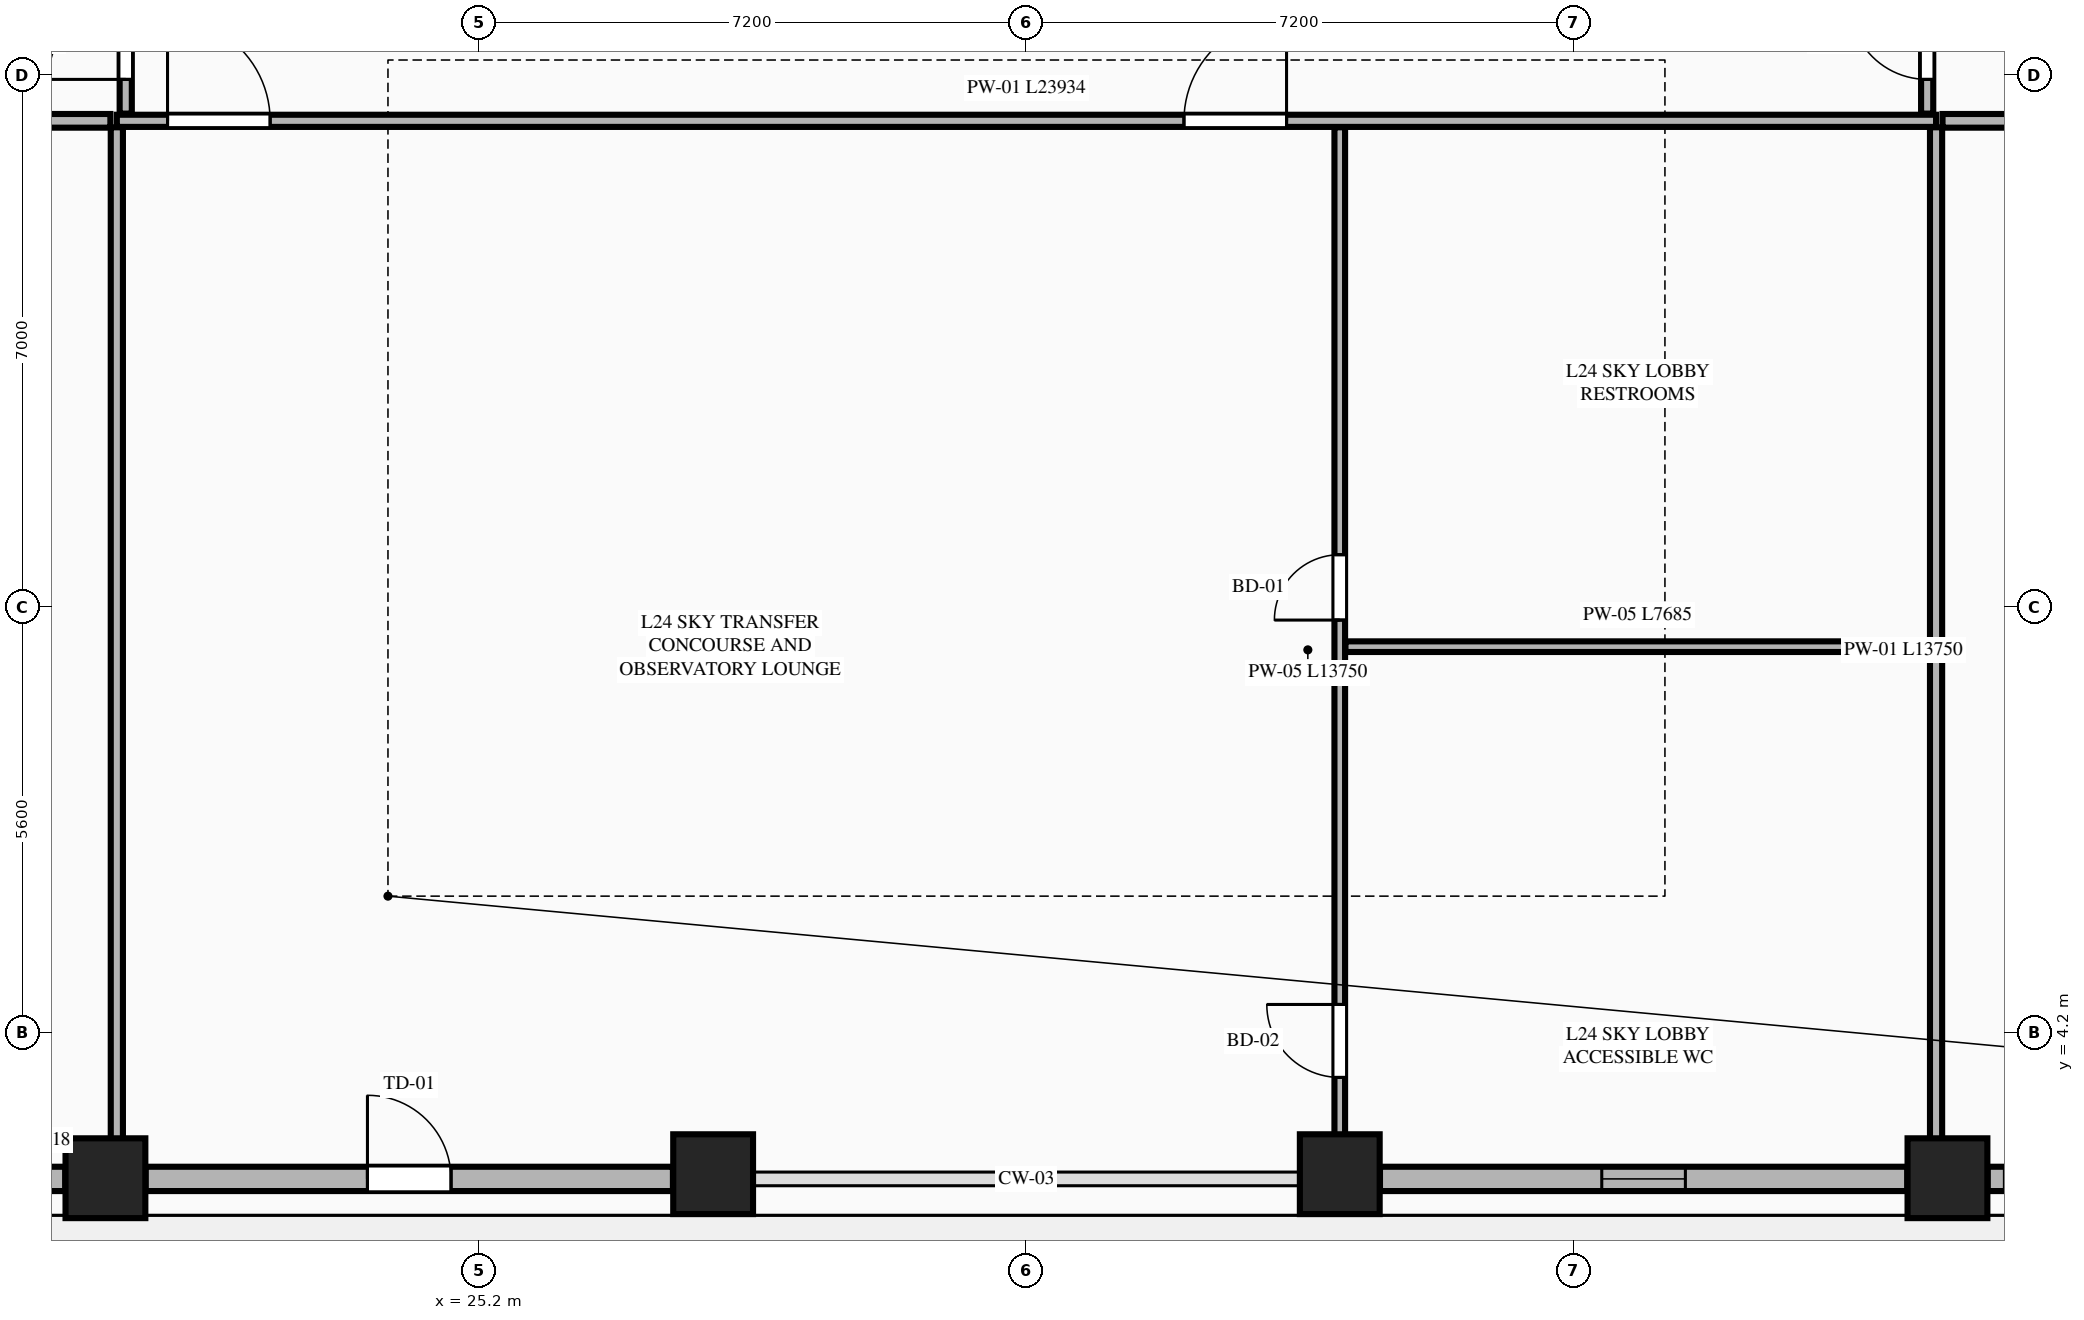
"""IFC4 building model, lengths in metres.
Left out: names, types, materials, properties, quantities, classifications, styles, units other than length and angle.
Written with IfcOpenShell. Run it as: python <this file> out.ifc"""

import sys

from ifc_helpers import new_model, si_unit, direction, frame, frame_2d, origin, origin_2d, place, context, subcontext, project, spatial, rectangle, extrude, element, fill, save


model = new_model("IFC4")
c1 = context("Model", 3, precision=1e-05, world=origin(), true_north=direction((0.0, 1.0)))
c2 = subcontext(c1, "Body", "Model", "MODEL_VIEW")
j1 = project(units=[si_unit("LENGTHUNIT", "METRE"), si_unit("PLANEANGLEUNIT", "RADIAN")], contexts=[c1])
p1 = place(None, origin())
s1 = spatial("IfcSite", under=j1, at=p1, CompositionType="ELEMENT")
p2 = place(p1, origin())
s2 = spatial("IfcBuilding", under=s1, at=p2, CompositionType="ELEMENT")
p3 = place(p2, frame((0.0, 0.0, 94.2)))
s3 = spatial("IfcBuildingStorey", under=s2, at=p3, CompositionType="ELEMENT", Elevation=94.2)
for number, where, z_axis, x_axis in (
    (1, (20.283, 2.289, 0.0), (0.0, 0.0, 1.0), (1.0, 0.0, 0.0)),
    (2, (28.278, 2.342, 0.0), (0.0, 0.0, 1.0), (1.0, 0.0, 0.0)),
    (3, (36.522, 2.342, 0.0), (0.0, 0.0, 1.0), (1.0, 0.0, 0.0)),
    (4, (44.517, 2.289, 0.0), (0.0, 0.0, 1.0), (1.0, 0.0, 0.0)),
):
    element("IfcColumn", number, at=place(p3, frame(where, z_axis=z_axis, x_axis=x_axis)), inside=s3, PredefinedType="COLUMN", context=c2, shape_type="SweptSolid", body=[
        extrude(rectangle(XDim=1.05, YDim=1.05, at=origin_2d()), origin(), (0.0, 0.0, 1.0), 4.2),
    ])
p4 = place(p3, frame((18.436, 2.28, 0.0), z_axis=(0.0, 0.0, 1.0), x_axis=(1.0, 0.0, 0.0)))
e5 = element("IfcWall", 5, at=p4, inside=s3, PredefinedType="STANDARD", context=c2, shape_type="SweptSolid", body=[
    extrude(rectangle(XDim=1.318, YDim=0.32, at=frame_2d((0.659, 0.0))), origin(), (0.0, 0.0, 1.0), 3.99),
])
p5 = place(p4, frame((0.22, 0.0, 0.75)))
e6 = element("IfcOpeningElement", 6, at=p5, cuts=e5, PredefinedType="OPENING", context=c2, shape_type="SweptSolid", body=[
    extrude(rectangle(XDim=0.878, YDim=1.7, at=frame_2d((0.439, 0.85))), frame((0.0, 0.17, 0.0), z_axis=(0.0, -1.0, 0.0), x_axis=(1.0, 0.0, 0.0)), (0.0, 0.0, 1.0), 0.34),
])
p6 = place(p3, frame((20.812, 2.28, 0.0), z_axis=(0.0, 0.0, 1.0), x_axis=(1.0, 0.0, 0.0)))
e7 = element("IfcWall", 7, at=p6, inside=s3, PredefinedType="STANDARD", context=c2, shape_type="SweptSolid", body=[
    extrude(rectangle(XDim=6.937, YDim=0.32, at=frame_2d((3.469, 0.0))), origin(), (0.0, 0.0, 1.0), 2.59),
])
p7 = place(p6, frame((2.918, 0.0, 0.0)))
e8 = element("IfcOpeningElement", 8, at=p7, cuts=e7, PredefinedType="OPENING", context=c2, shape_type="SweptSolid", body=[
    extrude(rectangle(XDim=1.1, YDim=2.25, at=frame_2d((0.55, 1.125))), frame((0.0, 0.17, 0.0), z_axis=(0.0, -1.0, 0.0), x_axis=(1.0, 0.0, 0.0)), (0.0, 0.0, 1.0), 0.34),
])
p8 = place(p3, frame((37.051, 2.28, 0.0), z_axis=(0.0, 0.0, 1.0), x_axis=(1.0, 0.0, 0.0)))
e9 = element("IfcWall", 9, at=p8, inside=s3, PredefinedType="STANDARD", context=c2, shape_type="SweptSolid", body=[
    extrude(rectangle(XDim=6.937, YDim=0.32, at=frame_2d((3.469, 0.0))), origin(), (0.0, 0.0, 1.0), 2.59),
])
p9 = place(p8, frame((2.918, 0.0, 0.75)))
e10 = element("IfcOpeningElement", 10, at=p9, cuts=e9, PredefinedType="OPENING", context=c2, shape_type="SweptSolid", body=[
    extrude(rectangle(XDim=1.1, YDim=1.69, at=frame_2d((0.55, 0.845))), frame((0.0, 0.17, 0.0), z_axis=(0.0, -1.0, 0.0), x_axis=(1.0, 0.0, 0.0)), (0.0, 0.0, 1.0), 0.34),
])
p10 = place(p3, frame((45.046, 2.28, 0.0), z_axis=(0.0, 0.0, 1.0), x_axis=(1.0, 0.0, 0.0)))
e11 = element("IfcWall", 11, at=p10, inside=s3, PredefinedType="STANDARD", context=c2, shape_type="SweptSolid", body=[
    extrude(rectangle(XDim=1.318, YDim=0.32, at=frame_2d((0.659, 0.0))), origin(), (0.0, 0.0, 1.0), 3.99),
])
p11 = place(p10, frame((0.22, 0.0, 0.75)))
e12 = element("IfcOpeningElement", 12, at=p11, cuts=e11, PredefinedType="OPENING", context=c2, shape_type="SweptSolid", body=[
    extrude(rectangle(XDim=0.878, YDim=1.7, at=frame_2d((0.439, 0.85))), frame((0.0, 0.17, 0.0), z_axis=(0.0, -1.0, 0.0), x_axis=(1.0, 0.0, 0.0)), (0.0, 0.0, 1.0), 0.34),
])
p12 = place(p3, frame((20.433, 16.2, 0.0), z_axis=(0.0, 0.0, 1.0), x_axis=(1.0, 0.0, 0.0)))
e13 = element("IfcWall", 13, at=p12, inside=s3, PredefinedType="PARTITIONING", context=c2, shape_type="SweptSolid", body=[
    extrude(rectangle(XDim=23.934, YDim=0.16, at=frame_2d((11.967, 0.0))), origin(), (0.0, 0.0, 1.0), 3.99),
])
p13 = place(p12, frame((0.667, 0.0, 0.0)))
e14 = element("IfcOpeningElement", 14, at=p13, cuts=e13, PredefinedType="OPENING", context=c2, shape_type="SweptSolid", body=[
    extrude(rectangle(XDim=1.35, YDim=2.35, at=frame_2d((0.675, 1.175))), frame((0.0, 0.09, 0.0), z_axis=(0.0, -1.0, 0.0), x_axis=(1.0, 0.0, 0.0)), (0.0, 0.0, 1.0), 0.18),
])
p14 = place(p12, frame((14.039, 0.0, 0.0)))
e15 = element("IfcOpeningElement", 15, at=p14, cuts=e13, PredefinedType="OPENING", context=c2, shape_type="SweptSolid", body=[
    extrude(rectangle(XDim=1.35, YDim=2.35, at=frame_2d((0.675, 1.175))), frame((0.0, 0.09, 0.0), z_axis=(0.0, -1.0, 0.0), x_axis=(1.0, 0.0, 0.0)), (0.0, 0.0, 1.0), 0.18),
])
p15 = place(p3, frame((36.522, 2.365, 0.0), z_axis=(0.0, 0.0, 1.0), x_axis=(0.0, 1.0, 0.0)))
e16 = element("IfcWall", 16, at=p15, inside=s3, PredefinedType="PLUMBINGWALL", context=c2, shape_type="SweptSolid", body=[
    extrude(rectangle(XDim=13.75, YDim=0.14, at=frame_2d((6.875, 0.0))), origin(), (0.0, 0.0, 1.0), 2.59),
])
p16 = place(p15, frame((7.267, 0.0, 0.0)))
e17 = element("IfcOpeningElement", 17, at=p16, cuts=e16, PredefinedType="OPENING", context=c2, shape_type="SweptSolid", body=[
    extrude(rectangle(XDim=0.86, YDim=2.1, at=frame_2d((0.43, 1.05))), frame((0.0, 0.08, 0.0), z_axis=(0.0, -1.0, 0.0), x_axis=(1.0, 0.0, 0.0)), (0.0, 0.0, 1.0), 0.16),
])
p17 = place(p15, frame((1.25, 0.0, 0.0)))
e18 = element("IfcOpeningElement", 18, at=p17, cuts=e16, PredefinedType="OPENING", context=c2, shape_type="SweptSolid", body=[
    extrude(rectangle(XDim=0.96, YDim=2.15, at=frame_2d((0.48, 1.075))), frame((0.0, 0.08, 0.0), z_axis=(0.0, -1.0, 0.0), x_axis=(1.0, 0.0, 0.0)), (0.0, 0.0, 1.0), 0.16),
])
p18 = place(p3, frame((36.597, 9.282, 0.0), z_axis=(0.0, 0.0, 1.0), x_axis=(1.0, 0.0, 0.0)))
e19 = element("IfcWall", 19, at=p18, inside=s3, PredefinedType="PLUMBINGWALL", context=c2, shape_type="SweptSolid", body=[
    extrude(rectangle(XDim=7.685, YDim=0.14, at=frame_2d((3.843, 0.0))), origin(), (0.0, 0.0, 1.0), 3.625),
])
for number, where, z_axis, x_axis in (
    (20, (44.367, 2.365, 0.0), (0.0, 0.0, 1.0), (0.0, 1.0, 0.0)),
    (21, (20.433, 2.365, 0.0), (0.0, 0.0, 1.0), (0.0, 1.0, 0.0)),
):
    element("IfcWall", number, at=place(p3, frame(where, z_axis=z_axis, x_axis=x_axis)), inside=s3, PredefinedType="PARTITIONING", context=c2, shape_type="SweptSolid", body=[
        extrude(rectangle(XDim=13.75, YDim=0.16, at=frame_2d((6.875, 0.0))), origin(), (0.0, 0.0, 1.0), 2.59),
    ])
p19 = place(p3, frame((10.426, 16.2, 0.0), z_axis=(0.0, 0.0, 1.0), x_axis=(1.0, 0.0, 0.0)))
e22 = element("IfcWall", 22, at=p19, inside=s3, PredefinedType="PARTITIONING", context=c2, shape_type="SweptSolid", body=[
    extrude(rectangle(XDim=9.922, YDim=0.18, at=frame_2d((4.961, 0.0))), origin(), (0.0, 0.0, 1.0), 3.99),
])
p20 = place(p3, frame((44.452, 16.2, 0.0), z_axis=(0.0, 0.0, 1.0), x_axis=(1.0, 0.0, 0.0)))
e23 = element("IfcWall", 23, at=p20, inside=s3, PredefinedType="PARTITIONING", context=c2, shape_type="SweptSolid", body=[
    extrude(rectangle(XDim=9.922, YDim=0.18, at=frame_2d((4.961, 0.0))), origin(), (0.0, 0.0, 1.0), 3.99),
])
p21 = place(p3, frame((20.55, 16.295, 0.0), z_axis=(0.0, 0.0, 1.0), x_axis=(0.0, 1.0, 0.0)))
e24 = element("IfcWall", 24, at=p21, inside=s3, PredefinedType="PARTITIONING", context=c2, shape_type="SweptSolid", body=[
    extrude(rectangle(XDim=19.36, YDim=0.16, at=frame_2d((9.68, 0.0))), origin(), (0.0, 0.0, 1.0), 2.59),
])
p22 = place(p21, frame((0.45, 0.0, 0.0)))
e25 = element("IfcOpeningElement", 25, at=p22, cuts=e24, PredefinedType="OPENING", context=c2, shape_type="SweptSolid", body=[
    extrude(rectangle(XDim=1.02, YDim=2.25, at=frame_2d((0.51, 1.125))), frame((0.0, 0.09, 0.0), z_axis=(0.0, -1.0, 0.0), x_axis=(1.0, 0.0, 0.0)), (0.0, 0.0, 1.0), 0.18),
])
p23 = place(p3, frame((44.25, 16.295, 0.0), z_axis=(0.0, 0.0, 1.0), x_axis=(0.0, 1.0, 0.0)))
e26 = element("IfcWall", 26, at=p23, inside=s3, PredefinedType="PARTITIONING", context=c2, shape_type="SweptSolid", body=[
    extrude(rectangle(XDim=19.36, YDim=0.16, at=frame_2d((9.68, 0.0))), origin(), (0.0, 0.0, 1.0), 2.59),
])
p24 = place(p23, frame((0.45, 0.0, 0.0)))
e27 = element("IfcOpeningElement", 27, at=p24, cuts=e26, PredefinedType="OPENING", context=c2, shape_type="SweptSolid", body=[
    extrude(rectangle(XDim=1.02, YDim=2.25, at=frame_2d((0.51, 1.125))), frame((0.0, 0.09, 0.0), z_axis=(0.0, -1.0, 0.0), x_axis=(1.0, 0.0, 0.0)), (0.0, 0.0, 1.0), 0.18),
])
p25 = place(p7, origin())
e28 = element("IfcDoor", 28, at=p25, inside=s3, OperationType="SINGLE_SWING_LEFT", PredefinedType="DOOR", context=c2, shape_type="SweptSolid", body=[
    extrude(rectangle(XDim=1.1, YDim=2.25, at=frame_2d((0.55, 1.125))), frame((0.0, 0.025, 0.0), z_axis=(0.0, -1.0, 0.0), x_axis=(1.0, 0.0, 0.0)), (0.0, 0.0, 1.0), 0.05),
])
fill(e8, e28)
p26 = place(p9, origin())
e29 = element("IfcWindow", 29, at=p26, inside=s3, PartitioningType="SINGLE_PANEL", PredefinedType="WINDOW", context=c2, shape_type="SweptSolid", body=[
    extrude(rectangle(XDim=1.1, YDim=1.69, at=frame_2d((0.55, 0.845))), frame((0.0, 0.03, 0.0), z_axis=(0.0, -1.0, 0.0), x_axis=(1.0, 0.0, 0.0)), (0.0, 0.0, 1.0), 0.06),
])
fill(e10, e29)
p27 = place(p16, origin())
e30 = element("IfcDoor", 30, at=p27, inside=s3, OperationType="SINGLE_SWING_LEFT", PredefinedType="DOOR", context=c2, shape_type="SweptSolid", body=[
    extrude(rectangle(XDim=0.86, YDim=2.1, at=frame_2d((0.43, 1.05))), frame((0.0, 0.025, 0.0), z_axis=(0.0, -1.0, 0.0), x_axis=(1.0, 0.0, 0.0)), (0.0, 0.0, 1.0), 0.05),
])
fill(e17, e30)
p28 = place(p17, origin())
e31 = element("IfcDoor", 31, at=p28, inside=s3, OperationType="SINGLE_SWING_RIGHT", PredefinedType="DOOR", context=c2, shape_type="SweptSolid", body=[
    extrude(rectangle(XDim=0.96, YDim=2.15, at=frame_2d((0.48, 1.075))), frame((0.0, 0.025, 0.0), z_axis=(0.0, -1.0, 0.0), x_axis=(1.0, 0.0, 0.0)), (0.0, 0.0, 1.0), 0.05),
])
fill(e18, e31)
p29 = place(p13, origin())
e32 = element("IfcDoor", 32, at=p29, inside=s3, OperationType="SINGLE_SWING_LEFT", PredefinedType="DOOR", context=c2, shape_type="SweptSolid", body=[
    extrude(rectangle(XDim=1.35, YDim=2.35, at=frame_2d((0.675, 1.175))), frame((0.0, 0.025, 0.0), z_axis=(0.0, -1.0, 0.0), x_axis=(1.0, 0.0, 0.0)), (0.0, 0.0, 1.0), 0.05),
])
fill(e14, e32)
p30 = place(p14, origin())
e33 = element("IfcDoor", 33, at=p30, inside=s3, OperationType="SINGLE_SWING_RIGHT", PredefinedType="DOOR", context=c2, shape_type="SweptSolid", body=[
    extrude(rectangle(XDim=1.35, YDim=2.35, at=frame_2d((0.675, 1.175))), frame((0.0, 0.025, 0.0), z_axis=(0.0, -1.0, 0.0), x_axis=(1.0, 0.0, 0.0)), (0.0, 0.0, 1.0), 0.05),
])
fill(e15, e33)
p31 = place(p22, origin())
e34 = element("IfcDoor", 34, at=p31, inside=s3, OperationType="SINGLE_SWING_LEFT", PredefinedType="DOOR", context=c2, shape_type="SweptSolid", body=[
    extrude(rectangle(XDim=1.02, YDim=2.25, at=frame_2d((0.51, 1.125))), frame((0.0, 0.025, 0.0), z_axis=(0.0, -1.0, 0.0), x_axis=(1.0, 0.0, 0.0)), (0.0, 0.0, 1.0), 0.05),
])
fill(e25, e34)
p32 = place(p24, origin())
e35 = element("IfcDoor", 35, at=p32, inside=s3, OperationType="SINGLE_SWING_RIGHT", PredefinedType="DOOR", context=c2, shape_type="SweptSolid", body=[
    extrude(rectangle(XDim=1.02, YDim=2.25, at=frame_2d((0.51, 1.125))), frame((0.0, 0.025, 0.0), z_axis=(0.0, -1.0, 0.0), x_axis=(1.0, 0.0, 0.0)), (0.0, 0.0, 1.0), 0.05),
])
fill(e27, e35)
p33 = place(p11, origin())
e36 = element("IfcWindow", 36, at=p33, inside=s3, PartitioningType="SINGLE_PANEL", PredefinedType="WINDOW", context=c2, shape_type="SweptSolid", body=[
    extrude(rectangle(XDim=0.878, YDim=1.7, at=frame_2d((0.439, 0.85))), frame((0.0, 0.03, 0.0), z_axis=(0.0, -1.0, 0.0), x_axis=(1.0, 0.0, 0.0)), (0.0, 0.0, 1.0), 0.06),
])
fill(e12, e36)
save(model, sys.argv[1])
